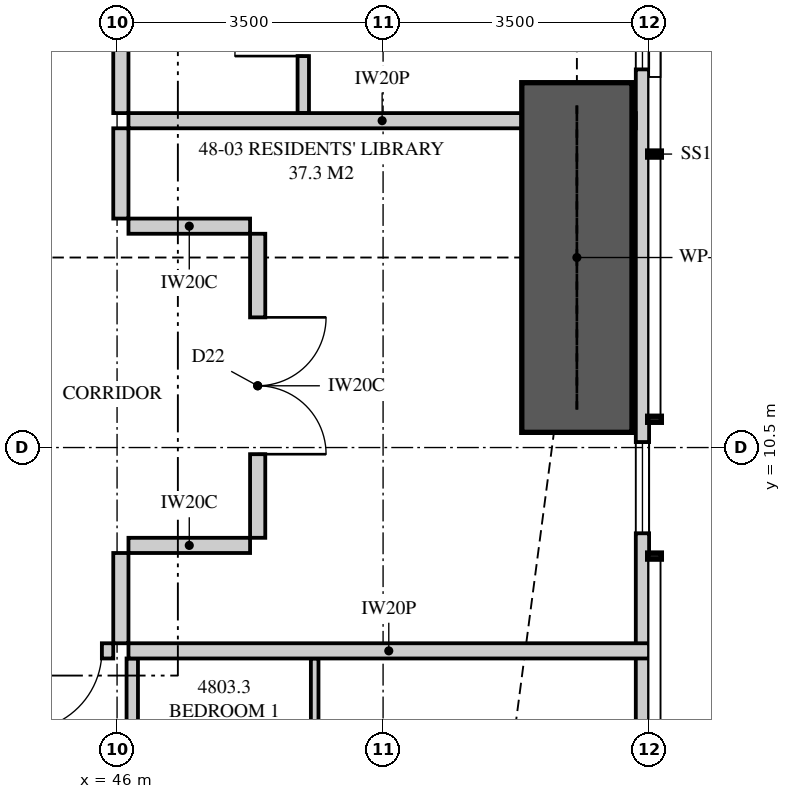
"""IFC4 building model, lengths in metres.
Left out: names, types, materials, properties, quantities, classifications, styles, units other than length and angle.
Written with IfcOpenShell. Run it as: python <this file> out.ifc"""

import sys

from ifc_helpers import new_model, si_unit, direction, frame, frame_2d, origin, place, context, subcontext, project, spatial, polyline, rectangle, outline, extrude, element, fill, save


model = new_model("IFC4")
c1 = context("Model", 3, precision=1e-05, world=origin(), true_north=direction((0.0, 1.0)))
c2 = subcontext(c1, "Body", "Model", "MODEL_VIEW")
j1 = project(units=[si_unit("LENGTHUNIT", "METRE"), si_unit("PLANEANGLEUNIT", "RADIAN")], contexts=[c1])
p1 = place(None, origin())
s1 = spatial("IfcSite", under=j1, at=p1, CompositionType="ELEMENT")
p2 = place(p1, origin())
s2 = spatial("IfcBuilding", under=s1, at=p2, CompositionType="ELEMENT")
p3 = place(p2, frame((0.0, 0.0, 177.8)))
s3 = spatial("IfcBuildingStorey", under=s2, at=p3, CompositionType="ELEMENT", Elevation=177.8)
p4 = place(p3, frame((52.913, 3.051, 0.0), z_axis=(0.0, 0.0, 1.0), x_axis=(0.0, 1.0, 0.0)))
e1 = element("IfcWall", 1, at=p4, inside=s3, PredefinedType="SOLIDWALL", context=c2, shape_type="SweptSolid", body=[
    extrude(outline(polyline([(0.0, 0.0), (29.897, 0.0), (29.897, 3.11), (22.167, 3.11), (22.167, 2.15), (22.074, 2.15), (22.074, 3.11), (21.949, 3.11), (21.949, 2.15), (9.949, 2.15), (9.949, 3.11), (9.847, 3.11), (9.847, 2.15), (9.706, 2.15), (9.706, 3.11), (0.0, 3.11), (0.0, 0.0)])), frame((0.0, 0.087, 0.0), z_axis=(0.0, -1.0, 0.0), x_axis=(1.0, 0.0, 0.0)), (0.0, 0.0, 1.0), 0.175),
])
p5 = place(p4, frame((1.797, 0.0, 0.4)))
e2 = element("IfcOpeningElement", 2, at=p5, cuts=e1, PredefinedType="OPENING", context=c2, shape_type="SweptSolid", body=[
    extrude(rectangle(XDim=1.8, YDim=1.7, at=frame_2d((0.9, 0.85))), frame((0.0, 0.097, 0.0), z_axis=(0.0, -1.0, 0.0), x_axis=(1.0, 0.0, 0.0)), (0.0, 0.0, 1.0), 0.195),
])
p6 = place(p4, frame((6.321, 0.0, 0.4)))
e3 = element("IfcOpeningElement", 3, at=p6, cuts=e1, PredefinedType="OPENING", context=c2, shape_type="SweptSolid", body=[
    extrude(rectangle(XDim=1.2, YDim=1.7, at=frame_2d((0.6, 0.85))), frame((0.0, 0.097, 0.0), z_axis=(0.0, -1.0, 0.0), x_axis=(1.0, 0.0, 0.0)), (0.0, 0.0, 1.0), 0.195),
])
p7 = place(p4, frame((12.424, 0.0, 0.4)))
e4 = element("IfcOpeningElement", 4, at=p7, cuts=e1, PredefinedType="OPENING", context=c2, shape_type="SweptSolid", body=[
    extrude(rectangle(XDim=1.8, YDim=1.7, at=frame_2d((0.9, 0.85))), frame((0.0, 0.097, 0.0), z_axis=(0.0, -1.0, 0.0), x_axis=(1.0, 0.0, 0.0)), (0.0, 0.0, 1.0), 0.195),
])
p8 = place(p4, frame((15.274, 0.0, 0.0)))
e5 = element("IfcOpeningElement", 5, at=p8, cuts=e1, PredefinedType="OPENING", context=c2, shape_type="SweptSolid", body=[
    extrude(rectangle(XDim=1.8, YDim=2.1, at=frame_2d((0.9, 1.05))), frame((0.0, 0.097, 0.0), z_axis=(0.0, -1.0, 0.0), x_axis=(1.0, 0.0, 0.0)), (0.0, 0.0, 1.0), 0.195),
])
p9 = place(p4, frame((17.736, 0.0, 0.4)))
e6 = element("IfcOpeningElement", 6, at=p9, cuts=e1, PredefinedType="OPENING", context=c2, shape_type="SweptSolid", body=[
    extrude(rectangle(XDim=1.8, YDim=1.7, at=frame_2d((0.9, 0.85))), frame((0.0, 0.097, 0.0), z_axis=(0.0, -1.0, 0.0), x_axis=(1.0, 0.0, 0.0)), (0.0, 0.0, 1.0), 0.195),
])
p10 = place(p4, frame((24.373, 0.0, 0.4)))
e7 = element("IfcOpeningElement", 7, at=p10, cuts=e1, PredefinedType="OPENING", context=c2, shape_type="SweptSolid", body=[
    extrude(rectangle(XDim=1.2, YDim=1.7, at=frame_2d((0.6, 0.85))), frame((0.0, 0.097, 0.0), z_axis=(0.0, -1.0, 0.0), x_axis=(1.0, 0.0, 0.0)), (0.0, 0.0, 1.0), 0.195),
])
p11 = place(p4, frame((26.861, 0.0, 0.4)))
e8 = element("IfcOpeningElement", 8, at=p11, cuts=e1, PredefinedType="OPENING", context=c2, shape_type="SweptSolid", body=[
    extrude(rectangle(XDim=2.4, YDim=1.7, at=frame_2d((1.2, 0.85))), frame((0.0, 0.097, 0.0), z_axis=(0.0, -1.0, 0.0), x_axis=(1.0, 0.0, 0.0)), (0.0, 0.0, 1.0), 0.195),
])
p12 = place(p3, frame((41.3, 7.825, 0.0), z_axis=(0.0, 0.0, 1.0), x_axis=(1.0, 0.0, 0.0)))
e9 = element("IfcWall", 9, at=p12, inside=s3, PredefinedType="PARTITIONING", context=c2, shape_type="SweptSolid", body=[
    extrude(outline(polyline([(0.0, 0.0), (4.65, 0.0), (4.65, 3.11), (1.787, 3.11), (1.787, 2.541), (1.113, 2.541), (1.113, 3.11), (0.0, 3.11), (0.0, 0.0)])), frame((0.0, 0.1, 0.0), z_axis=(0.0, -1.0, 0.0), x_axis=(1.0, 0.0, 0.0)), (0.0, 0.0, 1.0), 0.2),
])
p13 = place(p12, frame((3.45, 0.0, 0.0)))
e10 = element("IfcOpeningElement", 10, at=p13, cuts=e9, PredefinedType="OPENING", context=c2, shape_type="SweptSolid", body=[
    extrude(rectangle(XDim=1.05, YDim=2.2, at=frame_2d((0.525, 1.1))), frame((0.0, 0.11, 0.0), z_axis=(0.0, -1.0, 0.0), x_axis=(1.0, 0.0, 0.0)), (0.0, 0.0, 1.0), 0.22),
])
p14 = place(p3, frame((48.6, 3.796, 0.0), z_axis=(0.0, 0.0, 1.0), x_axis=(0.0, 1.0, 0.0)))
e11 = element("IfcWall", 11, at=p14, inside=s3, PredefinedType="PARTITIONING", context=c2, shape_type="SweptSolid", body=[
    extrude(rectangle(XDim=3.929, YDim=0.1, at=frame_2d((1.964, 0.0))), origin(), (0.0, 0.0, 1.0), 3.11),
])
p15 = place(p14, frame((1.477, 0.0, 0.0)))
e12 = element("IfcOpeningElement", 12, at=p15, cuts=e11, PredefinedType="OPENING", context=c2, shape_type="SweptSolid", body=[
    extrude(rectangle(XDim=0.9, YDim=2.1, at=frame_2d((0.45, 1.05))), frame((0.0, 0.06, 0.0), z_axis=(0.0, -1.0, 0.0), x_axis=(1.0, 0.0, 0.0)), (0.0, 0.0, 1.0), 0.12),
])
p16 = place(p3, frame((46.2, 3.796, 0.0), z_axis=(0.0, 0.0, 1.0), x_axis=(0.0, 1.0, 0.0)))
e13 = element("IfcWall", 13, at=p16, inside=s3, PredefinedType="PLUMBINGWALL", context=c2, shape_type="SweptSolid", body=[
    extrude(rectangle(XDim=3.929, YDim=0.15, at=frame_2d((1.964, 0.0))), origin(), (0.0, 0.0, 1.0), 3.11),
])
p17 = place(p3, frame((46.15, 7.825, 0.0), z_axis=(0.0, 0.0, 1.0), x_axis=(1.0, 0.0, 0.0)))
e14 = element("IfcWall", 14, at=p17, inside=s3, PredefinedType="PARTITIONING", context=c2, shape_type="SweptSolid", body=[
    extrude(outline(polyline([(0.0, 0.0), (6.85, 0.0), (6.85, 3.11), (6.138, 3.11), (6.138, 2.15), (4.303, 2.15), (4.303, 3.11), (0.0, 3.11), (0.0, 0.0)])), frame((0.0, 0.1, 0.0), z_axis=(0.0, -1.0, 0.0), x_axis=(1.0, 0.0, 0.0)), (0.0, 0.0, 1.0), 0.2),
])
p18 = place(p3, frame((52.825, 14.8, 0.0), z_axis=(0.0, 0.0, 1.0), x_axis=(-1.0, 0.0, 0.0)))
e15 = element("IfcWall", 15, at=p18, inside=s3, PredefinedType="PARTITIONING", context=c2, shape_type="SweptSolid", body=[
    extrude(outline(polyline([(0.529, 2.15), (0.0, 2.15), (0.0, 0.0), (0.529, 0.0), (0.529, 0.039), (1.021, 0.039), (1.021, 0.0), (6.675, 0.0), (6.675, 3.11), (1.685, 3.11), (1.685, 2.15), (1.021, 2.15), (1.021, 2.111), (0.529, 2.111), (0.529, 2.15)])), frame((0.0, 0.1, 0.0), z_axis=(0.0, -1.0, 0.0), x_axis=(1.0, 0.0, 0.0)), (0.0, 0.0, 1.0), 0.2),
])
p19 = place(p3, frame((46.05, 7.925, 0.0), z_axis=(0.0, 0.0, 1.0), x_axis=(0.0, 1.0, 0.0)))
e16 = element("IfcWall", 16, at=p19, inside=s3, PredefinedType="PARTITIONING", context=c2, shape_type="SweptSolid", body=[
    extrude(rectangle(XDim=1.188, YDim=0.2, at=frame_2d((0.594, 0.0))), origin(), (0.0, 0.0, 1.0), 3.11),
])
p20 = place(p3, frame((46.05, 14.9, 0.0), z_axis=(0.0, 0.0, 1.0), x_axis=(0.0, 1.0, 0.0)))
e17 = element("IfcWall", 17, at=p20, inside=s3, PredefinedType="PARTITIONING", context=c2, shape_type="SweptSolid", body=[
    extrude(rectangle(XDim=8.15, YDim=0.2, at=frame_2d((4.075, 0.0))), origin(), (0.0, 0.0, 1.0), 3.11),
])
p21 = place(p20, frame((3.575, 0.0, 0.0)))
e18 = element("IfcOpeningElement", 18, at=p21, cuts=e17, PredefinedType="OPENING", context=c2, shape_type="SweptSolid", body=[
    extrude(rectangle(XDim=1.05, YDim=2.2, at=frame_2d((0.525, 1.1))), frame((0.0, 0.11, 0.0), z_axis=(0.0, -1.0, 0.0), x_axis=(1.0, 0.0, 0.0)), (0.0, 0.0, 1.0), 0.22),
])
p22 = place(p3, frame((48.45, 14.9, 0.0), z_axis=(0.0, 0.0, 1.0), x_axis=(0.0, 1.0, 0.0)))
e19 = element("IfcWall", 19, at=p22, inside=s3, PredefinedType="PLUMBINGWALL", context=c2, shape_type="SweptSolid", body=[
    extrude(rectangle(XDim=2.425, YDim=0.15, at=frame_2d((1.212, 0.0))), origin(), (0.0, 0.0, 1.0), 3.11),
])
p23 = place(p22, frame((0.75, 0.0, 0.0)))
e20 = element("IfcOpeningElement", 20, at=p23, cuts=e19, PredefinedType="OPENING", context=c2, shape_type="SweptSolid", body=[
    extrude(rectangle(XDim=0.9, YDim=2.1, at=frame_2d((0.45, 1.05))), frame((0.0, 0.085, 0.0), z_axis=(0.0, -1.0, 0.0), x_axis=(1.0, 0.0, 0.0)), (0.0, 0.0, 1.0), 0.17),
])
p24 = place(p3, frame((46.05, 13.512, 0.0), z_axis=(0.0, 0.0, 1.0), x_axis=(0.0, 1.0, 0.0)))
e21 = element("IfcWall", 21, at=p24, inside=s3, PredefinedType="PARTITIONING", context=c2, shape_type="SweptSolid", body=[
    extrude(rectangle(XDim=1.188, YDim=0.2, at=frame_2d((0.594, 0.0))), origin(), (0.0, 0.0, 1.0), 3.11),
])
p25 = place(p3, frame((47.85, 9.312, 0.0), z_axis=(0.0, 0.0, 1.0), x_axis=(0.0, 1.0, 0.0)))
e22 = element("IfcWall", 22, at=p25, inside=s3, PredefinedType="PARTITIONING", context=c2, shape_type="SweptSolid", body=[
    extrude(outline(polyline([(0.0, 0.0), (4.0, 0.0), (4.0, 3.11), (4.0, 2.541), (3.35, 2.541), (3.35, 3.11), (0.0, 3.11), (0.0, 0.0)])), frame((0.0, 0.1, 0.0), z_axis=(0.0, -1.0, 0.0), x_axis=(1.0, 0.0, 0.0)), (0.0, 0.0, 1.0), 0.2),
])
p26 = place(p25, frame((1.1, 0.0, 0.0)))
e23 = element("IfcOpeningElement", 23, at=p26, cuts=e22, PredefinedType="OPENING", context=c2, shape_type="SweptSolid", body=[
    extrude(rectangle(XDim=1.8, YDim=2.1, at=frame_2d((0.9, 1.05))), frame((0.0, 0.11, 0.0), z_axis=(0.0, -1.0, 0.0), x_axis=(1.0, 0.0, 0.0)), (0.0, 0.0, 1.0), 0.22),
])
for number, where, z_axis, x_axis in (
    (24, (46.15, 9.212, 0.0), (0.0, 0.0, 1.0), (1.0, 0.0, 0.0)),
    (25, (46.15, 13.413, 0.0), (0.0, 0.0, 1.0), (1.0, 0.0, 0.0)),
):
    element("IfcWall", number, at=place(p3, frame(where, z_axis=z_axis, x_axis=x_axis)), inside=s3, PredefinedType="PARTITIONING", context=c2, shape_type="SweptSolid", body=[
        extrude(rectangle(XDim=1.6, YDim=0.2, at=frame_2d((0.8, 0.0))), origin(), (0.0, 0.0, 1.0), 3.11),
    ])
p27 = place(p3, frame((52.05, 10.7, 0.0), z_axis=(0.0, 0.0, 1.0), x_axis=(0.0, 1.0, 0.0)))
e26 = element("IfcWall", 26, at=p27, inside=s3, PredefinedType="SHEAR", context=c2, shape_type="SweptSolid", body=[
    extrude(rectangle(XDim=4.6, YDim=1.45, at=frame_2d((2.3, 0.0))), origin(), (0.0, 0.0, 1.0), 3.35),
])
p28 = place(p6, origin())
e27 = element("IfcWindow", 27, at=p28, inside=s3, PartitioningType="SINGLE_PANEL", PredefinedType="WINDOW", context=c2, shape_type="SweptSolid", body=[
    extrude(rectangle(XDim=1.2, YDim=1.7, at=frame_2d((0.6, 0.85))), frame((0.0, 0.03, 0.0), z_axis=(0.0, -1.0, 0.0), x_axis=(1.0, 0.0, 0.0)), (0.0, 0.0, 1.0), 0.06),
])
fill(e3, e27)
p29 = place(p7, origin())
e28 = element("IfcWindow", 28, at=p29, inside=s3, PartitioningType="SINGLE_PANEL", PredefinedType="WINDOW", context=c2, shape_type="SweptSolid", body=[
    extrude(rectangle(XDim=1.8, YDim=1.7, at=frame_2d((0.9, 0.85))), frame((0.0, 0.03, 0.0), z_axis=(0.0, -1.0, 0.0), x_axis=(1.0, 0.0, 0.0)), (0.0, 0.0, 1.0), 0.06),
])
fill(e4, e28)
p30 = place(p13, frame((1.05, 0.0, 0.0), z_axis=(0.0, 0.0, 1.0), x_axis=(-1.0, 0.0, 0.0)))
e29 = element("IfcDoor", 29, at=p30, inside=s3, OperationType="SINGLE_SWING_RIGHT", PredefinedType="DOOR", context=c2, shape_type="SweptSolid", body=[
    extrude(rectangle(XDim=1.05, YDim=2.2, at=frame_2d((0.525, 1.1))), frame((0.0, 0.025, 0.0), z_axis=(0.0, -1.0, 0.0), x_axis=(1.0, 0.0, 0.0)), (0.0, 0.0, 1.0), 0.05),
])
fill(e10, e29)
p31 = place(p26, frame((1.8, 0.0, 0.0), z_axis=(0.0, 0.0, 1.0), x_axis=(-1.0, 0.0, 0.0)))
e30 = element("IfcDoor", 30, at=p31, inside=s3, OperationType="DOUBLE_DOOR_SINGLE_SWING", PredefinedType="DOOR", context=c2, shape_type="SweptSolid", body=[
    extrude(rectangle(XDim=1.8, YDim=2.1, at=frame_2d((0.9, 1.05))), frame((0.0, 0.025, 0.0), z_axis=(0.0, -1.0, 0.0), x_axis=(1.0, 0.0, 0.0)), (0.0, 0.0, 1.0), 0.05),
])
fill(e23, e30)
p32 = place(p23, origin())
e31 = element("IfcDoor", 31, at=p32, inside=s3, OperationType="SINGLE_SWING_LEFT", PredefinedType="DOOR", context=c2, shape_type="SweptSolid", body=[
    extrude(rectangle(XDim=0.9, YDim=2.1, at=frame_2d((0.45, 1.05))), frame((0.0, 0.025, 0.0), z_axis=(0.0, -1.0, 0.0), x_axis=(1.0, 0.0, 0.0)), (0.0, 0.0, 1.0), 0.05),
])
fill(e20, e31)
save(model, sys.argv[1])
